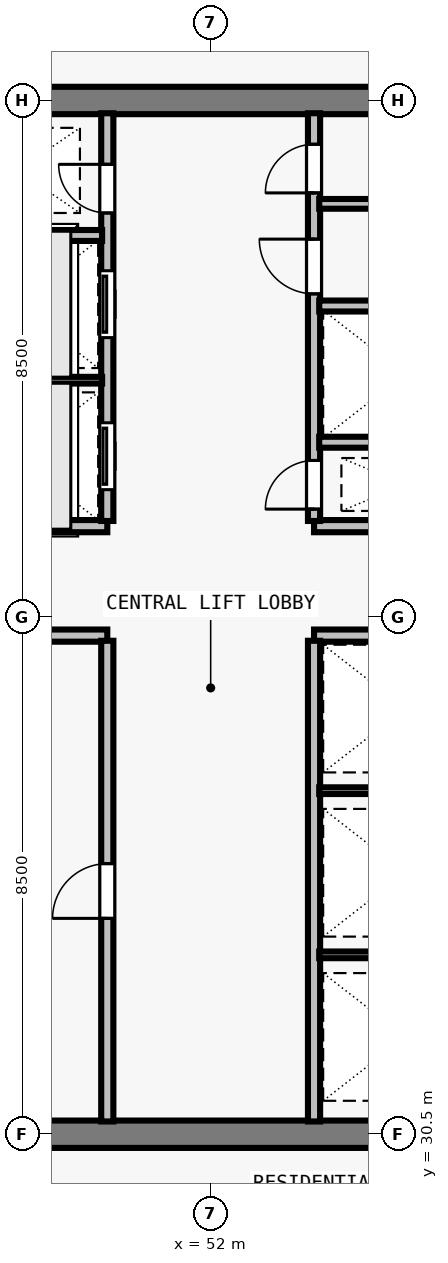
"""IFC4 building model, lengths in metres.
Left out: names, types, materials, properties, quantities, classifications, styles, units other than length and angle.
Written with IfcOpenShell. Run it as: python <this file> out.ifc"""

import sys

from ifc_helpers import new_model, si_unit, direction, frame, frame_2d, origin, place, context, subcontext, project, spatial, rectangle, extrude, element, fill, save


model = new_model("IFC4")
c1 = context("Model", 3, precision=1e-05, world=origin(), true_north=direction((0.0, 1.0)))
c2 = subcontext(c1, "Body", "Model", "MODEL_VIEW")
j1 = project(units=[si_unit("LENGTHUNIT", "METRE"), si_unit("PLANEANGLEUNIT", "RADIAN")], contexts=[c1])
p1 = place(None, origin())
s1 = spatial("IfcSite", under=j1, at=p1, CompositionType="ELEMENT")
p2 = place(p1, origin())
s2 = spatial("IfcBuilding", under=s1, at=p2, CompositionType="ELEMENT")
p3 = place(p2, frame((0.0, 0.0, 202.5)))
s3 = spatial("IfcBuildingStorey", under=s2, at=p3, CompositionType="ELEMENT", Elevation=202.5)
for number, where, z_axis, x_axis in (
    (1, (43.275, 30.5, 0.0), (0.0, 0.0, 1.0), (1.0, 0.0, 0.0)),
    (2, (43.275, 47.5, 0.0), (0.0, 0.0, 1.0), (1.0, 0.0, 0.0)),
):
    element("IfcWall", number, at=place(p3, frame(where, z_axis=z_axis, x_axis=x_axis)), inside=s3, PredefinedType="SHEAR", context=c2, shape_type="SweptSolid", body=[
        extrude(rectangle(XDim=17.45, YDim=0.45, at=frame_2d((8.725, 0.0))), origin(), (0.0, 0.0, 1.0), 3.29),
    ])
for number, where, z_axis, x_axis in (
    (3, (47.35, 38.7, 0.0), (0.0, 0.0, 1.0), (1.0, 0.0, 0.0)),
    (4, (47.35, 40.5, 0.0), (0.0, 0.0, 1.0), (1.0, 0.0, 0.0)),
    (5, (53.7, 38.7, 0.0), (0.0, 0.0, 1.0), (1.0, 0.0, 0.0)),
    (6, (53.7, 40.5, 0.0), (0.0, 0.0, 1.0), (1.0, 0.0, 0.0)),
):
    element("IfcWall", number, at=place(p3, frame(where, z_axis=z_axis, x_axis=x_axis)), inside=s3, PredefinedType="SOLIDWALL", context=c2, shape_type="SweptSolid", body=[
        extrude(rectangle(XDim=2.95, YDim=0.2, at=frame_2d((1.475, 0.0))), origin(), (0.0, 0.0, 1.0), 3.29),
    ])
p4 = place(p3, frame((50.3, 30.71, 0.0), z_axis=(0.0, 0.0, 1.0), x_axis=(0.0, 1.0, 0.0)))
e7 = element("IfcWall", 7, at=p4, inside=s3, PredefinedType="SOLIDWALL", context=c2, shape_type="SweptSolid", body=[
    extrude(rectangle(XDim=7.905, YDim=0.2, at=frame_2d((3.953, 0.0))), origin(), (0.0, 0.0, 1.0), 3.29),
])
p5 = place(p4, frame((3.34, 0.0, 0.0)))
e8 = element("IfcOpeningElement", 8, at=p5, cuts=e7, PredefinedType="OPENING", context=c2, shape_type="SweptSolid", body=[
    extrude(rectangle(XDim=0.9, YDim=2.12, at=frame_2d((0.45, 1.06))), frame((0.0, 0.11, 0.0), z_axis=(0.0, -1.0, 0.0), x_axis=(1.0, 0.0, 0.0)), (0.0, 0.0, 1.0), 0.22),
])
p6 = place(p3, frame((53.7, 30.71, 0.0), z_axis=(0.0, 0.0, 1.0), x_axis=(0.0, 1.0, 0.0)))
e9 = element("IfcWall", 9, at=p6, inside=s3, PredefinedType="SOLIDWALL", context=c2, shape_type="SweptSolid", body=[
    extrude(rectangle(XDim=7.905, YDim=0.2, at=frame_2d((3.953, 0.0))), origin(), (0.0, 0.0, 1.0), 3.29),
])
p7 = place(p3, frame((50.3, 40.585, 0.0), z_axis=(0.0, 0.0, 1.0), x_axis=(0.0, 1.0, 0.0)))
e10 = element("IfcWall", 10, at=p7, inside=s3, PredefinedType="SOLIDWALL", context=c2, shape_type="SweptSolid", body=[
    extrude(rectangle(XDim=6.705, YDim=0.2, at=frame_2d((3.353, 0.0))), origin(), (0.0, 0.0, 1.0), 3.29),
])
p8 = place(p7, frame((0.515, 0.0, 0.0)))
e11 = element("IfcOpeningElement", 11, at=p8, cuts=e10, PredefinedType="OPENING", context=c2, shape_type="SweptSolid", body=[
    extrude(rectangle(XDim=1.1, YDim=2.2, at=frame_2d((0.55, 1.1))), frame((0.0, 0.11, 0.0), z_axis=(0.0, -1.0, 0.0), x_axis=(1.0, 0.0, 0.0)), (0.0, 0.0, 1.0), 0.22),
])
p9 = place(p7, frame((3.015, 0.0, 0.0)))
e12 = element("IfcOpeningElement", 12, at=p9, cuts=e10, PredefinedType="OPENING", context=c2, shape_type="SweptSolid", body=[
    extrude(rectangle(XDim=1.1, YDim=2.2, at=frame_2d((0.55, 1.1))), frame((0.0, 0.11, 0.0), z_axis=(0.0, -1.0, 0.0), x_axis=(1.0, 0.0, 0.0)), (0.0, 0.0, 1.0), 0.22),
])
p10 = place(p7, frame((5.065, 0.0, 0.0)))
e13 = element("IfcOpeningElement", 13, at=p10, cuts=e10, PredefinedType="OPENING", context=c2, shape_type="SweptSolid", body=[
    extrude(rectangle(XDim=0.8, YDim=2.08, at=frame_2d((0.4, 1.04))), frame((0.0, 0.11, 0.0), z_axis=(0.0, -1.0, 0.0), x_axis=(1.0, 0.0, 0.0)), (0.0, 0.0, 1.0), 0.22),
])
p11 = place(p3, frame((53.7, 40.585, 0.0), z_axis=(0.0, 0.0, 1.0), x_axis=(0.0, 1.0, 0.0)))
e14 = element("IfcWall", 14, at=p11, inside=s3, PredefinedType="SOLIDWALL", context=c2, shape_type="SweptSolid", body=[
    extrude(rectangle(XDim=6.705, YDim=0.2, at=frame_2d((3.353, 0.0))), origin(), (0.0, 0.0, 1.0), 3.29),
])
p12 = place(p11, frame((0.195, 0.0, 0.0)))
e15 = element("IfcOpeningElement", 15, at=p12, cuts=e14, PredefinedType="OPENING", context=c2, shape_type="SweptSolid", body=[
    extrude(rectangle(XDim=0.8, YDim=2.08, at=frame_2d((0.4, 1.04))), frame((0.0, 0.11, 0.0), z_axis=(0.0, -1.0, 0.0), x_axis=(1.0, 0.0, 0.0)), (0.0, 0.0, 1.0), 0.22),
])
p13 = place(p11, frame((3.735, 0.0, 0.0)))
e16 = element("IfcOpeningElement", 16, at=p13, cuts=e14, PredefinedType="OPENING", context=c2, shape_type="SweptSolid", body=[
    extrude(rectangle(XDim=0.9, YDim=2.12, at=frame_2d((0.45, 1.06))), frame((0.0, 0.11, 0.0), z_axis=(0.0, -1.0, 0.0), x_axis=(1.0, 0.0, 0.0)), (0.0, 0.0, 1.0), 0.22),
])
p14 = place(p11, frame((5.395, 0.0, 0.0)))
e17 = element("IfcOpeningElement", 17, at=p14, cuts=e14, PredefinedType="OPENING", context=c2, shape_type="SweptSolid", body=[
    extrude(rectangle(XDim=0.8, YDim=2.1, at=frame_2d((0.4, 1.05))), frame((0.0, 0.11, 0.0), z_axis=(0.0, -1.0, 0.0), x_axis=(1.0, 0.0, 0.0)), (0.0, 0.0, 1.0), 0.22),
])
for number, where, z_axis, x_axis in (
    (18, (53.785, 33.45, 0.0), (0.0, 0.0, 1.0), (1.0, 0.0, 0.0)),
    (19, (53.785, 36.15, 0.0), (0.0, 0.0, 1.0), (1.0, 0.0, 0.0)),
):
    element("IfcWall", number, at=place(p3, frame(where, z_axis=z_axis, x_axis=x_axis)), inside=s3, PredefinedType="PARTITIONING", context=c2, shape_type="SweptSolid", body=[
        extrude(rectangle(XDim=2.79, YDim=0.11, at=frame_2d((1.395, 0.0))), origin(), (0.0, 0.0, 1.0), 3.29),
    ])
p15 = place(p3, frame((47.435, 42.9, 0.0), z_axis=(0.0, 0.0, 1.0), x_axis=(1.0, 0.0, 0.0)))
e20 = element("IfcWall", 20, at=p15, inside=s3, PredefinedType="PARTITIONING", context=c2, shape_type="SweptSolid", body=[
    extrude(rectangle(XDim=2.78, YDim=0.11, at=frame_2d((1.39, 0.0))), origin(), (0.0, 0.0, 1.0), 3.29),
])
p16 = place(p3, frame((47.425, 45.28, 0.0), z_axis=(0.0, 0.0, 1.0), x_axis=(1.0, 0.0, 0.0)))
e21 = element("IfcWall", 21, at=p16, inside=s3, PredefinedType="SOLIDWALL", context=c2, shape_type="SweptSolid", body=[
    extrude(rectangle(XDim=2.79, YDim=0.18, at=frame_2d((1.395, 0.0))), origin(), (0.0, 0.0, 1.0), 3.29),
])
p17 = place(p3, frame((53.785, 41.88, 0.0), z_axis=(0.0, 0.0, 1.0), x_axis=(1.0, 0.0, 0.0)))
e22 = element("IfcWall", 22, at=p17, inside=s3, PredefinedType="SOLIDWALL", context=c2, shape_type="SweptSolid", body=[
    extrude(rectangle(XDim=2.78, YDim=0.18, at=frame_2d((1.39, 0.0))), origin(), (0.0, 0.0, 1.0), 3.29),
])
p18 = place(p3, frame((53.785, 44.12, 0.0), z_axis=(0.0, 0.0, 1.0), x_axis=(1.0, 0.0, 0.0)))
e23 = element("IfcWall", 23, at=p18, inside=s3, PredefinedType="SOLIDWALL", context=c2, shape_type="SweptSolid", body=[
    extrude(rectangle(XDim=2.79, YDim=0.18, at=frame_2d((1.395, 0.0))), origin(), (0.0, 0.0, 1.0), 3.29),
])
p19 = place(p3, frame((53.785, 45.8, 0.0), z_axis=(0.0, 0.0, 1.0), x_axis=(1.0, 0.0, 0.0)))
e24 = element("IfcWall", 24, at=p19, inside=s3, PredefinedType="PARTITIONING", context=c2, shape_type="SweptSolid", body=[
    extrude(rectangle(XDim=2.79, YDim=0.16, at=frame_2d((1.395, 0.0))), origin(), (0.0, 0.0, 1.0), 3.29),
])
p20 = place(p5, origin())
e25 = element("IfcDoor", 25, at=p20, inside=s3, OperationType="SINGLE_SWING_LEFT", PredefinedType="DOOR", context=c2, shape_type="SweptSolid", body=[
    extrude(rectangle(XDim=0.9, YDim=2.12, at=frame_2d((0.45, 1.06))), frame((0.0, 0.025, 0.0), z_axis=(0.0, -1.0, 0.0), x_axis=(1.0, 0.0, 0.0)), (0.0, 0.0, 1.0), 0.05),
])
fill(e8, e25)
p21 = place(p8, origin())
e26 = element("IfcDoor", 26, at=p21, inside=s3, OperationType="SLIDING_TO_LEFT", PredefinedType="DOOR", context=c2, shape_type="SweptSolid", body=[
    extrude(rectangle(XDim=1.1, YDim=2.2, at=frame_2d((0.55, 1.1))), frame((0.0, 0.025, 0.0), z_axis=(0.0, -1.0, 0.0), x_axis=(1.0, 0.0, 0.0)), (0.0, 0.0, 1.0), 0.05),
])
fill(e11, e26)
p22 = place(p9, origin())
e27 = element("IfcDoor", 27, at=p22, inside=s3, OperationType="SLIDING_TO_LEFT", PredefinedType="DOOR", context=c2, shape_type="SweptSolid", body=[
    extrude(rectangle(XDim=1.1, YDim=2.2, at=frame_2d((0.55, 1.1))), frame((0.0, 0.025, 0.0), z_axis=(0.0, -1.0, 0.0), x_axis=(1.0, 0.0, 0.0)), (0.0, 0.0, 1.0), 0.05),
])
fill(e12, e27)
p23 = place(p10, origin())
e28 = element("IfcDoor", 28, at=p23, inside=s3, OperationType="SINGLE_SWING_RIGHT", PredefinedType="DOOR", context=c2, shape_type="SweptSolid", body=[
    extrude(rectangle(XDim=0.8, YDim=2.08, at=frame_2d((0.4, 1.04))), frame((0.0, 0.025, 0.0), z_axis=(0.0, -1.0, 0.0), x_axis=(1.0, 0.0, 0.0)), (0.0, 0.0, 1.0), 0.05),
])
fill(e13, e28)
p24 = place(p12, origin())
e29 = element("IfcDoor", 29, at=p24, inside=s3, OperationType="SINGLE_SWING_LEFT", PredefinedType="DOOR", context=c2, shape_type="SweptSolid", body=[
    extrude(rectangle(XDim=0.8, YDim=2.08, at=frame_2d((0.4, 1.04))), frame((0.0, 0.025, 0.0), z_axis=(0.0, -1.0, 0.0), x_axis=(1.0, 0.0, 0.0)), (0.0, 0.0, 1.0), 0.05),
])
fill(e15, e29)
p25 = place(p13, origin())
e30 = element("IfcDoor", 30, at=p25, inside=s3, OperationType="SINGLE_SWING_RIGHT", PredefinedType="DOOR", context=c2, shape_type="SweptSolid", body=[
    extrude(rectangle(XDim=0.9, YDim=2.12, at=frame_2d((0.45, 1.06))), frame((0.0, 0.025, 0.0), z_axis=(0.0, -1.0, 0.0), x_axis=(1.0, 0.0, 0.0)), (0.0, 0.0, 1.0), 0.05),
])
fill(e16, e30)
p26 = place(p14, origin())
e31 = element("IfcDoor", 31, at=p26, inside=s3, OperationType="SINGLE_SWING_LEFT", PredefinedType="DOOR", context=c2, shape_type="SweptSolid", body=[
    extrude(rectangle(XDim=0.8, YDim=2.1, at=frame_2d((0.4, 1.05))), frame((0.0, 0.025, 0.0), z_axis=(0.0, -1.0, 0.0), x_axis=(1.0, 0.0, 0.0)), (0.0, 0.0, 1.0), 0.05),
])
fill(e17, e31)
save(model, sys.argv[1])
